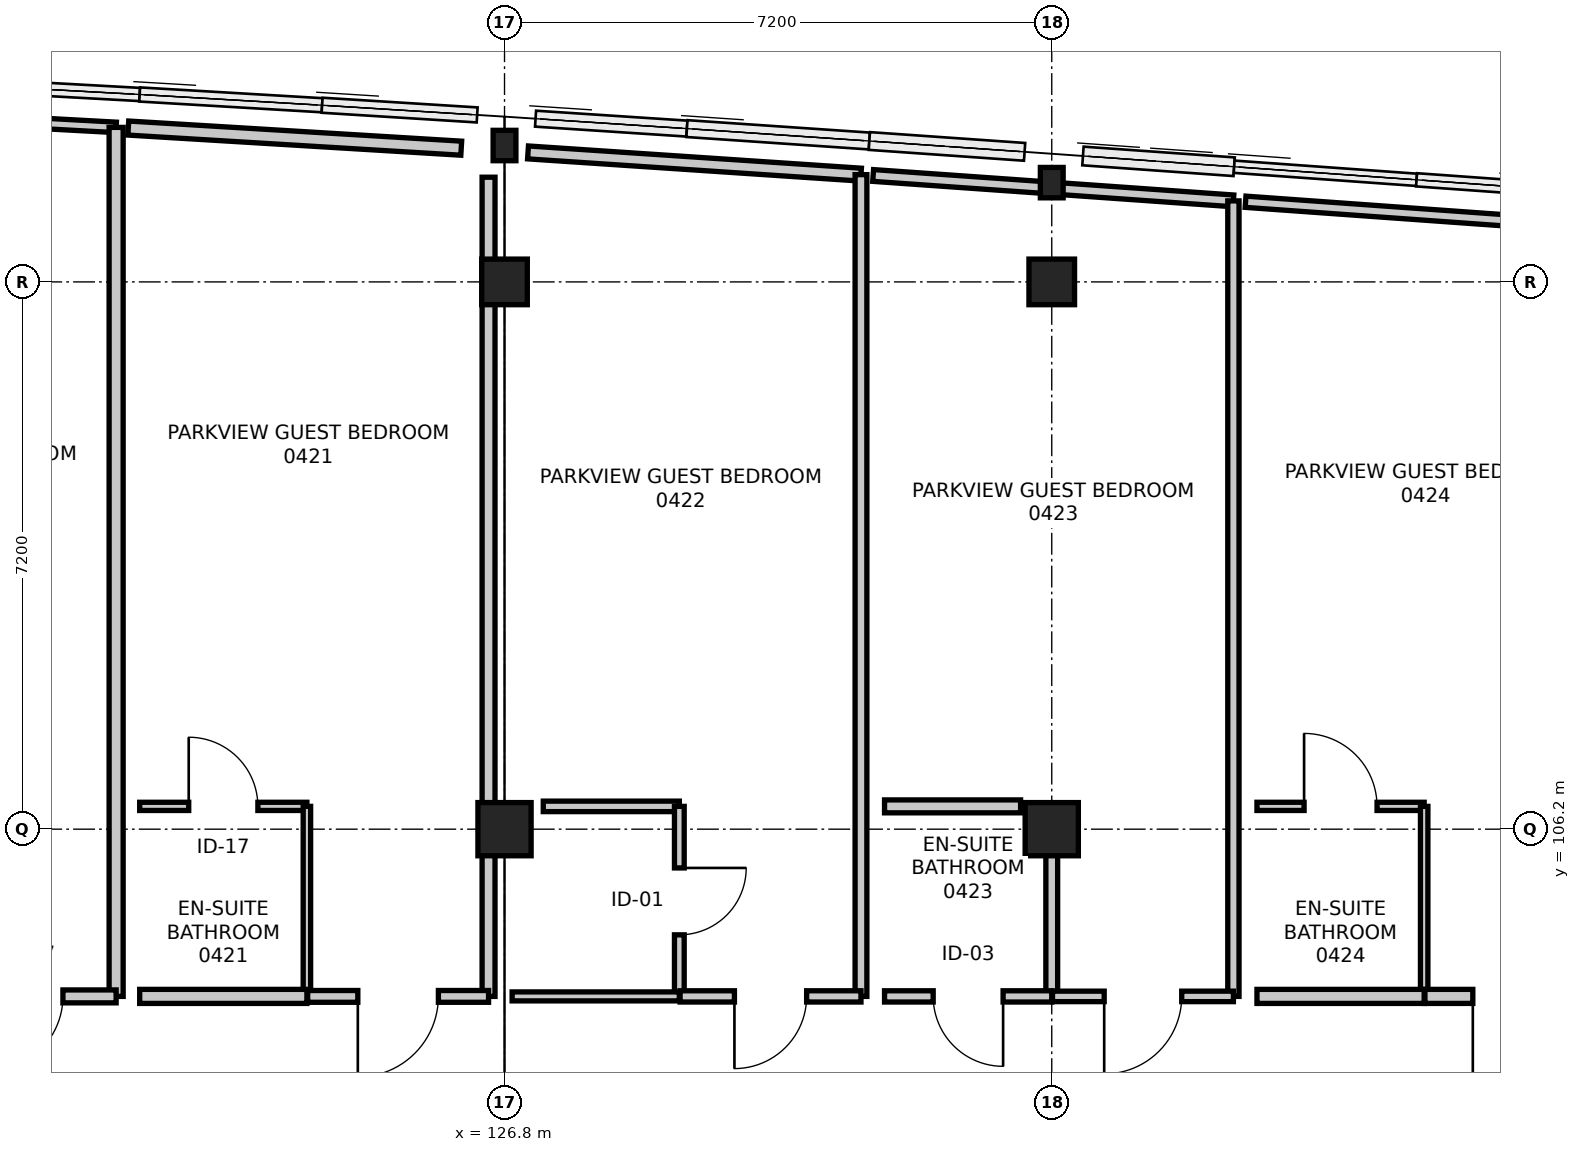
"""IFC4 building model, lengths in metres.
Left out: names, types, materials, properties, quantities, classifications, styles, units other than length and angle.
Written with IfcOpenShell. Run it as: python <this file> out.ifc"""

import sys

from ifc_helpers import new_model, si_unit, direction, frame, frame_2d, origin, origin_2d, place, context, subcontext, project, spatial, rectangle, i_section, extrude, element, fill, save


model = new_model("IFC4")
c1 = context("Model", 3, precision=1e-05, world=origin(), true_north=direction((0.0, 1.0)))
c2 = subcontext(c1, "Body", "Model", "MODEL_VIEW")
j1 = project(units=[si_unit("LENGTHUNIT", "METRE"), si_unit("PLANEANGLEUNIT", "RADIAN")], contexts=[c1])
p1 = place(None, origin())
s1 = spatial("IfcSite", under=j1, at=p1, CompositionType="ELEMENT")
p2 = place(p1, origin())
s2 = spatial("IfcBuilding", under=s1, at=p2, CompositionType="ELEMENT")
p3 = place(p2, frame((0.0, 0.0, 19.2)))
s3 = spatial("IfcBuildingStorey", under=s2, at=p3, CompositionType="ELEMENT", Elevation=19.2)
p4 = place(p3, frame((126.8, 106.2, 0.0), z_axis=(0.0, 0.0, 1.0), x_axis=(1.0, 0.0, 0.0)))
e1 = element("IfcColumn", 1, at=p4, inside=s3, PredefinedType="COLUMN", context=c2, shape_type="SweptSolid", body=[
    extrude(rectangle(XDim=0.7, YDim=0.7, at=origin_2d()), origin(), (0.0, 0.0, 1.0), 3.6),
])
p5 = place(p3, frame((126.8, 113.4, 0.0), z_axis=(0.0, 0.0, 1.0), x_axis=(1.0, 0.0, 0.0)))
e2 = element("IfcColumn", 2, at=p5, inside=s3, PredefinedType="COLUMN", context=c2, shape_type="SweptSolid", body=[
    extrude(rectangle(XDim=0.6, YDim=0.6, at=origin_2d()), origin(), (0.0, 0.0, 1.0), 3.6),
])
p6 = place(p3, frame((126.8, 115.194, 0.0), z_axis=(0.0, 0.0, 1.0), x_axis=(1.0, 0.0, 0.0)))
e3 = element("IfcColumn", 3, at=p6, inside=s3, PredefinedType="COLUMN", context=c2, shape_type="SweptSolid", body=[
    extrude(i_section(OverallWidth=0.3, OverallDepth=0.4, WebThickness=0.013, FlangeThickness=0.024, FilletRadius=0.027, at=origin_2d()), origin(), (0.0, 0.0, 1.0), 3.6),
])
p7 = place(p3, frame((134.0, 106.2, 0.0), z_axis=(0.0, 0.0, 1.0), x_axis=(1.0, 0.0, 0.0)))
e4 = element("IfcColumn", 4, at=p7, inside=s3, PredefinedType="COLUMN", context=c2, shape_type="SweptSolid", body=[
    extrude(rectangle(XDim=0.7, YDim=0.7, at=origin_2d()), origin(), (0.0, 0.0, 1.0), 3.6),
])
p8 = place(p3, frame((134.0, 113.4, 0.0), z_axis=(0.0, 0.0, 1.0), x_axis=(1.0, 0.0, 0.0)))
e5 = element("IfcColumn", 5, at=p8, inside=s3, PredefinedType="COLUMN", context=c2, shape_type="SweptSolid", body=[
    extrude(rectangle(XDim=0.6, YDim=0.6, at=origin_2d()), origin(), (0.0, 0.0, 1.0), 3.6),
])
p9 = place(p3, frame((134.0, 114.706, 0.0), z_axis=(0.0, 0.0, 1.0), x_axis=(1.0, 0.0, 0.0)))
e6 = element("IfcColumn", 6, at=p9, inside=s3, PredefinedType="COLUMN", context=c2, shape_type="SweptSolid", body=[
    extrude(i_section(OverallWidth=0.3, OverallDepth=0.4, WebThickness=0.013, FlangeThickness=0.024, FilletRadius=0.027, at=origin_2d()), origin(), (0.0, 0.0, 1.0), 3.6),
])
p10 = place(p3, frame((119.679, 115.542, 0.0), z_axis=(0.0, 0.0, 1.0), x_axis=(0.998523490871, -0.054321617961, 0.0)))
e7 = element("IfcWall", 7, at=p10, inside=s3, PredefinedType="PARTITIONING", context=c2, shape_type="SweptSolid", body=[
    extrude(rectangle(XDim=2.013, YDim=0.138, at=frame_2d((1.007, 0.0))), origin(), (0.0, 0.0, 1.0), 2.926),
])
p11 = place(p3, frame((121.69, 115.433, 0.0), z_axis=(0.0, 0.0, 1.0), x_axis=(0.0, -1.0, 0.0)))
e8 = element("IfcWall", 8, at=p11, inside=s3, PredefinedType="PARTITIONING", context=c2, shape_type="SweptSolid", body=[
    extrude(rectangle(XDim=11.433, YDim=0.185, at=frame_2d((5.716, 0.0))), origin(), (0.0, 0.0, 1.0), 2.735),
])
p12 = place(p3, frame((121.69, 104.0, 0.0), z_axis=(0.0, 0.0, 1.0), x_axis=(-1.0, 0.0, 0.0)))
e9 = element("IfcWall", 9, at=p12, inside=s3, PredefinedType="PARTITIONING", context=c2, shape_type="SweptSolid", body=[
    extrude(rectangle(XDim=2.38, YDim=0.17, at=frame_2d((1.19, 0.0))), origin(), (0.0, 0.0, 1.0), 2.685),
])
p13 = place(p12, frame((0.7, 0.0, 0.0)))
e10 = element("IfcOpeningElement", 10, at=p13, cuts=e9, PredefinedType="OPENING", context=c2, shape_type="SweptSolid", body=[
    extrude(rectangle(XDim=0.98, YDim=2.15, at=frame_2d((0.49, 1.075))), frame((0.0, 0.095, 0.0), z_axis=(0.0, -1.0, 0.0), x_axis=(1.0, 0.0, 0.0)), (0.0, 0.0, 1.0), 0.19),
])
p14 = place(p3, frame((122.0, 106.5, 0.0), z_axis=(0.0, 0.0, 1.0), x_axis=(1.0, 0.0, 0.0)))
e11 = element("IfcWall", 11, at=p14, inside=s3, PredefinedType="PARTITIONING", context=c2, shape_type="SweptSolid", body=[
    extrude(rectangle(XDim=2.2, YDim=0.108, at=frame_2d((1.1, 0.0))), origin(), (0.0, 0.0, 1.0), 3.35),
])
p15 = place(p14, frame((0.645, 0.0, 0.0)))
e12 = element("IfcOpeningElement", 12, at=p15, cuts=e11, PredefinedType="OPENING", context=c2, shape_type="SweptSolid", body=[
    extrude(rectangle(XDim=0.91, YDim=2.11, at=frame_2d((0.455, 1.055))), frame((0.0, 0.064, 0.0), z_axis=(0.0, -1.0, 0.0), x_axis=(1.0, 0.0, 0.0)), (0.0, 0.0, 1.0), 0.128),
])
p16 = place(p3, frame((124.2, 106.5, 0.0), z_axis=(0.0, 0.0, 1.0), x_axis=(0.0, -1.0, 0.0)))
e13 = element("IfcWall", 13, at=p16, inside=s3, PredefinedType="PARTITIONING", context=c2, shape_type="SweptSolid", body=[
    extrude(rectangle(XDim=2.5, YDim=0.098, at=frame_2d((1.25, 0.0))), origin(), (0.0, 0.0, 1.0), 2.735),
])
p17 = place(p3, frame((124.2, 104.0, 0.0), z_axis=(0.0, 0.0, 1.0), x_axis=(-1.0, 0.0, 0.0)))
e14 = element("IfcWall", 14, at=p17, inside=s3, PredefinedType="PARTITIONING", context=c2, shape_type="SweptSolid", body=[
    extrude(rectangle(XDim=2.2, YDim=0.185, at=frame_2d((1.1, 0.0))), origin(), (0.0, 0.0, 1.0), 3.35),
])
p18 = place(p3, frame((121.85, 115.424, 0.0), z_axis=(0.0, 0.0, 1.0), x_axis=(0.998176732674, -0.060359012147, 0.0)))
e15 = element("IfcWall", 15, at=p18, inside=s3, PredefinedType="PARTITIONING", context=c2, shape_type="SweptSolid", body=[
    extrude(rectangle(XDim=4.389, YDim=0.185, at=frame_2d((2.194, 0.0))), origin(), (0.0, 0.0, 1.0), 2.926),
])
p19 = place(p3, frame((126.59, 114.777, 0.0), z_axis=(0.0, 0.0, 1.0), x_axis=(0.0, -1.0, 0.0)))
e16 = element("IfcWall", 16, at=p19, inside=s3, PredefinedType="PARTITIONING", context=c2, shape_type="SweptSolid", body=[
    extrude(rectangle(XDim=10.777, YDim=0.17, at=frame_2d((5.389, 0.0))), origin(), (0.0, 0.0, 1.0), 2.685),
])
p20 = place(p3, frame((126.59, 104.0, 0.0), z_axis=(0.0, 0.0, 1.0), x_axis=(-1.0, 0.0, 0.0)))
e17 = element("IfcWall", 17, at=p20, inside=s3, PredefinedType="PARTITIONING", context=c2, shape_type="SweptSolid", body=[
    extrude(rectangle(XDim=2.38, YDim=0.155, at=frame_2d((1.19, 0.0))), origin(), (0.0, 0.0, 1.0), 2.685),
])
p21 = place(p20, frame((0.66, 0.0, 0.0)))
e18 = element("IfcOpeningElement", 18, at=p21, cuts=e17, PredefinedType="OPENING", context=c2, shape_type="SweptSolid", body=[
    extrude(rectangle(XDim=1.06, YDim=2.2, at=frame_2d((0.53, 1.1))), frame((0.0, 0.087, 0.0), z_axis=(0.0, -1.0, 0.0), x_axis=(1.0, 0.0, 0.0)), (0.0, 0.0, 1.0), 0.175),
])
p22 = place(p3, frame((127.31, 106.5, 0.0), z_axis=(0.0, 0.0, 1.0), x_axis=(1.0, 0.0, 0.0)))
e19 = element("IfcWall", 19, at=p22, inside=s3, PredefinedType="PARTITIONING", context=c2, shape_type="SweptSolid", body=[
    extrude(rectangle(XDim=1.79, YDim=0.138, at=frame_2d((0.895, 0.0))), origin(), (0.0, 0.0, 1.0), 3.35),
])
p23 = place(p3, frame((129.1, 106.5, 0.0), z_axis=(0.0, 0.0, 1.0), x_axis=(0.0, -1.0, 0.0)))
e20 = element("IfcWall", 20, at=p23, inside=s3, PredefinedType="PARTITIONING", context=c2, shape_type="SweptSolid", body=[
    extrude(rectangle(XDim=2.5, YDim=0.128, at=frame_2d((1.25, 0.0))), origin(), (0.0, 0.0, 1.0), 2.735),
])
p24 = place(p23, frame((0.81, 0.0, 0.0)))
e21 = element("IfcOpeningElement", 21, at=p24, cuts=e20, PredefinedType="OPENING", context=c2, shape_type="SweptSolid", body=[
    extrude(rectangle(XDim=0.88, YDim=2.06, at=frame_2d((0.44, 1.03))), frame((0.0, 0.074, 0.0), z_axis=(0.0, -1.0, 0.0), x_axis=(1.0, 0.0, 0.0)), (0.0, 0.0, 1.0), 0.148),
])
p25 = place(p3, frame((129.1, 104.0, 0.0), z_axis=(0.0, 0.0, 1.0), x_axis=(-1.0, 0.0, 0.0)))
e22 = element("IfcWall", 22, at=p25, inside=s3, PredefinedType="PARTITIONING", context=c2, shape_type="SweptSolid", body=[
    extrude(rectangle(XDim=2.2, YDim=0.118, at=frame_2d((1.1, 0.0))), origin(), (0.0, 0.0, 1.0), 2.685),
])
p26 = place(p3, frame((127.109, 115.104, 0.0), z_axis=(0.0, 0.0, 1.0), x_axis=(0.997782450576, -0.066559607297, 0.0)))
e23 = element("IfcWall", 23, at=p26, inside=s3, PredefinedType="PARTITIONING", context=c2, shape_type="SweptSolid", body=[
    extrude(rectangle(XDim=4.391, YDim=0.17, at=frame_2d((2.195, 0.0))), origin(), (0.0, 0.0, 1.0), 2.926),
])
p27 = place(p3, frame((131.49, 114.811, 0.0), z_axis=(0.0, 0.0, 1.0), x_axis=(0.0, -1.0, 0.0)))
e24 = element("IfcWall", 24, at=p27, inside=s3, PredefinedType="PARTITIONING", context=c2, shape_type="SweptSolid", body=[
    extrude(rectangle(XDim=10.811, YDim=0.155, at=frame_2d((5.406, 0.0))), origin(), (0.0, 0.0, 1.0), 2.735),
])
p28 = place(p3, frame((131.49, 104.0, 0.0), z_axis=(0.0, 0.0, 1.0), x_axis=(-1.0, 0.0, 0.0)))
e25 = element("IfcWall", 25, at=p28, inside=s3, PredefinedType="PARTITIONING", context=c2, shape_type="SweptSolid", body=[
    extrude(rectangle(XDim=2.38, YDim=0.148, at=frame_2d((1.19, 0.0))), origin(), (0.0, 0.0, 1.0), 3.35),
])
p29 = place(p28, frame((0.715, 0.0, 0.0)))
e26 = element("IfcOpeningElement", 26, at=p29, cuts=e25, PredefinedType="OPENING", context=c2, shape_type="SweptSolid", body=[
    extrude(rectangle(XDim=0.95, YDim=2.1, at=frame_2d((0.475, 1.05))), frame((0.0, 0.084, 0.0), z_axis=(0.0, -1.0, 0.0), x_axis=(1.0, 0.0, 0.0)), (0.0, 0.0, 1.0), 0.168),
])
p30 = place(p3, frame((131.8, 106.5, 0.0), z_axis=(0.0, 0.0, 1.0), x_axis=(1.0, 0.0, 0.0)))
e27 = element("IfcWall", 27, at=p30, inside=s3, PredefinedType="PARTITIONING", context=c2, shape_type="SweptSolid", body=[
    extrude(rectangle(XDim=1.79, YDim=0.17, at=frame_2d((0.895, 0.0))), origin(), (0.0, 0.0, 1.0), 2.735),
])
p31 = place(p3, frame((134.0, 106.09, 0.0), z_axis=(0.0, 0.0, 1.0), x_axis=(0.0, -1.0, 0.0)))
e28 = element("IfcWall", 28, at=p31, inside=s3, PredefinedType="PARTITIONING", context=c2, shape_type="SweptSolid", body=[
    extrude(rectangle(XDim=2.09, YDim=0.155, at=frame_2d((1.045, 0.0))), origin(), (0.0, 0.0, 1.0), 2.685),
])
p32 = place(p3, frame((134.0, 104.0, 0.0), z_axis=(0.0, 0.0, 1.0), x_axis=(-1.0, 0.0, 0.0)))
e29 = element("IfcWall", 29, at=p32, inside=s3, PredefinedType="PARTITIONING", context=c2, shape_type="SweptSolid", body=[
    extrude(rectangle(XDim=2.2, YDim=0.148, at=frame_2d((1.1, 0.0))), origin(), (0.0, 0.0, 1.0), 2.685),
])
p33 = place(p32, frame((0.64, 0.0, 0.0)))
e30 = element("IfcOpeningElement", 30, at=p33, cuts=e29, PredefinedType="OPENING", context=c2, shape_type="SweptSolid", body=[
    extrude(rectangle(XDim=0.92, YDim=2.1, at=frame_2d((0.46, 1.05))), frame((0.0, 0.084, 0.0), z_axis=(0.0, -1.0, 0.0), x_axis=(1.0, 0.0, 0.0)), (0.0, 0.0, 1.0), 0.168),
])
p34 = place(p3, frame((131.65, 114.8, 0.0), z_axis=(0.0, 0.0, 1.0), x_axis=(0.997523226445, -0.070337846871, 0.0)))
e31 = element("IfcWall", 31, at=p34, inside=s3, PredefinedType="PARTITIONING", context=c2, shape_type="SweptSolid", body=[
    extrude(rectangle(XDim=4.752, YDim=0.155, at=frame_2d((2.376, 0.0))), origin(), (0.0, 0.0, 1.0), 2.926),
])
p35 = place(p3, frame((136.39, 114.466, 0.0), z_axis=(0.0, 0.0, 1.0), x_axis=(0.0, -1.0, 0.0)))
e32 = element("IfcWall", 32, at=p35, inside=s3, PredefinedType="PARTITIONING", context=c2, shape_type="SweptSolid", body=[
    extrude(rectangle(XDim=10.466, YDim=0.148, at=frame_2d((5.233, 0.0))), origin(), (0.0, 0.0, 1.0), 2.735),
])
p36 = place(p3, frame((136.39, 104.0, 0.0), z_axis=(0.0, 0.0, 1.0), x_axis=(-1.0, 0.0, 0.0)))
e33 = element("IfcWall", 33, at=p36, inside=s3, PredefinedType="PARTITIONING", context=c2, shape_type="SweptSolid", body=[
    extrude(rectangle(XDim=2.38, YDim=0.138, at=frame_2d((1.19, 0.0))), origin(), (0.0, 0.0, 1.0), 2.685),
])
p37 = place(p36, frame((0.68, 0.0, 0.0)))
e34 = element("IfcOpeningElement", 34, at=p37, cuts=e33, PredefinedType="OPENING", context=c2, shape_type="SweptSolid", body=[
    extrude(rectangle(XDim=1.02, YDim=2.15, at=frame_2d((0.51, 1.075))), frame((0.0, 0.079, 0.0), z_axis=(0.0, -1.0, 0.0), x_axis=(1.0, 0.0, 0.0)), (0.0, 0.0, 1.0), 0.158),
])
p38 = place(p3, frame((136.7, 106.5, 0.0), z_axis=(0.0, 0.0, 1.0), x_axis=(1.0, 0.0, 0.0)))
e35 = element("IfcWall", 35, at=p38, inside=s3, PredefinedType="PARTITIONING", context=c2, shape_type="SweptSolid", body=[
    extrude(rectangle(XDim=2.2, YDim=0.108, at=frame_2d((1.1, 0.0))), origin(), (0.0, 0.0, 1.0), 3.35),
])
p39 = place(p38, frame((0.62, 0.0, 0.0)))
e36 = element("IfcOpeningElement", 36, at=p39, cuts=e35, PredefinedType="OPENING", context=c2, shape_type="SweptSolid", body=[
    extrude(rectangle(XDim=0.96, YDim=2.14, at=frame_2d((0.48, 1.07))), frame((0.0, 0.064, 0.0), z_axis=(0.0, -1.0, 0.0), x_axis=(1.0, 0.0, 0.0)), (0.0, 0.0, 1.0), 0.128),
])
p40 = place(p3, frame((138.9, 106.5, 0.0), z_axis=(0.0, 0.0, 1.0), x_axis=(0.0, -1.0, 0.0)))
e37 = element("IfcWall", 37, at=p40, inside=s3, PredefinedType="PARTITIONING", context=c2, shape_type="SweptSolid", body=[
    extrude(rectangle(XDim=2.5, YDim=0.098, at=frame_2d((1.25, 0.0))), origin(), (0.0, 0.0, 1.0), 2.735),
])
p41 = place(p3, frame((138.9, 104.0, 0.0), z_axis=(0.0, 0.0, 1.0), x_axis=(-1.0, 0.0, 0.0)))
e38 = element("IfcWall", 38, at=p41, inside=s3, PredefinedType="PARTITIONING", context=c2, shape_type="SweptSolid", body=[
    extrude(rectangle(XDim=2.2, YDim=0.185, at=frame_2d((1.1, 0.0))), origin(), (0.0, 0.0, 1.0), 3.35),
])
p42 = place(p3, frame((136.55, 114.455, 0.0), z_axis=(0.0, 0.0, 1.0), x_axis=(0.997443290186, -0.071462457721, 0.0)))
e39 = element("IfcWall", 39, at=p42, inside=s3, PredefinedType="PARTITIONING", context=c2, shape_type="SweptSolid", body=[
    extrude(rectangle(XDim=4.752, YDim=0.148, at=frame_2d((2.376, 0.0))), origin(), (0.0, 0.0, 1.0), 2.926),
])
p43 = place(p3, frame((141.29, 104.0, 0.0), z_axis=(0.0, 0.0, 1.0), x_axis=(-1.0, 0.0, 0.0)))
e40 = element("IfcWall", 40, at=p43, inside=s3, PredefinedType="PARTITIONING", context=c2, shape_type="SweptSolid", body=[
    extrude(rectangle(XDim=2.38, YDim=0.185, at=frame_2d((1.19, 0.0))), origin(), (0.0, 0.0, 1.0), 2.685),
])
p44 = place(p43, frame((0.63, 0.0, 0.0)))
e41 = element("IfcOpeningElement", 41, at=p44, cuts=e40, PredefinedType="OPENING", context=c2, shape_type="SweptSolid", body=[
    extrude(rectangle(XDim=1.12, YDim=2.2, at=frame_2d((0.56, 1.1))), frame((0.0, 0.103, 0.0), z_axis=(0.0, -1.0, 0.0), x_axis=(1.0, 0.0, 0.0)), (0.0, 0.0, 1.0), 0.205),
])
p45 = place(p13, origin())
e42 = element("IfcDoor", 42, at=p45, inside=s3, OperationType="SINGLE_SWING_RIGHT", PredefinedType="DOOR", context=c2, shape_type="SweptSolid", body=[
    extrude(rectangle(XDim=0.98, YDim=2.15, at=frame_2d((0.49, 1.075))), frame((0.0, 0.025, 0.0), z_axis=(0.0, -1.0, 0.0), x_axis=(1.0, 0.0, 0.0)), (0.0, 0.0, 1.0), 0.05),
])
fill(e10, e42)
p46 = place(p15, origin())
e43 = element("IfcDoor", 43, at=p46, inside=s3, OperationType="SINGLE_SWING_LEFT", PredefinedType="DOOR", context=c2, shape_type="SweptSolid", body=[
    extrude(rectangle(XDim=0.91, YDim=2.11, at=frame_2d((0.455, 1.055))), frame((0.0, 0.025, 0.0), z_axis=(0.0, -1.0, 0.0), x_axis=(1.0, 0.0, 0.0)), (0.0, 0.0, 1.0), 0.05),
])
fill(e12, e43)
p47 = place(p21, origin())
e44 = element("IfcDoor", 44, at=p47, inside=s3, OperationType="SINGLE_SWING_RIGHT", PredefinedType="DOOR", context=c2, shape_type="SweptSolid", body=[
    extrude(rectangle(XDim=1.06, YDim=2.2, at=frame_2d((0.53, 1.1))), frame((0.0, 0.025, 0.0), z_axis=(0.0, -1.0, 0.0), x_axis=(1.0, 0.0, 0.0)), (0.0, 0.0, 1.0), 0.05),
])
fill(e18, e44)
p48 = place(p24, origin())
e45 = element("IfcDoor", 45, at=p48, inside=s3, OperationType="SINGLE_SWING_LEFT", PredefinedType="DOOR", context=c2, shape_type="SweptSolid", body=[
    extrude(rectangle(XDim=0.88, YDim=2.06, at=frame_2d((0.44, 1.03))), frame((0.0, 0.025, 0.0), z_axis=(0.0, -1.0, 0.0), x_axis=(1.0, 0.0, 0.0)), (0.0, 0.0, 1.0), 0.05),
])
fill(e21, e45)
p49 = place(p29, origin())
e46 = element("IfcDoor", 46, at=p49, inside=s3, OperationType="SINGLE_SWING_RIGHT", PredefinedType="DOOR", context=c2, shape_type="SweptSolid", body=[
    extrude(rectangle(XDim=0.95, YDim=2.1, at=frame_2d((0.475, 1.05))), frame((0.0, 0.025, 0.0), z_axis=(0.0, -1.0, 0.0), x_axis=(1.0, 0.0, 0.0)), (0.0, 0.0, 1.0), 0.05),
])
fill(e26, e46)
p50 = place(p33, origin())
e47 = element("IfcDoor", 47, at=p50, inside=s3, OperationType="SINGLE_SWING_LEFT", PredefinedType="DOOR", context=c2, shape_type="SweptSolid", body=[
    extrude(rectangle(XDim=0.92, YDim=2.1, at=frame_2d((0.46, 1.05))), frame((0.0, 0.025, 0.0), z_axis=(0.0, -1.0, 0.0), x_axis=(1.0, 0.0, 0.0)), (0.0, 0.0, 1.0), 0.05),
])
fill(e30, e47)
p51 = place(p37, origin())
e48 = element("IfcDoor", 48, at=p51, inside=s3, OperationType="SINGLE_SWING_RIGHT", PredefinedType="DOOR", context=c2, shape_type="SweptSolid", body=[
    extrude(rectangle(XDim=1.02, YDim=2.15, at=frame_2d((0.51, 1.075))), frame((0.0, 0.025, 0.0), z_axis=(0.0, -1.0, 0.0), x_axis=(1.0, 0.0, 0.0)), (0.0, 0.0, 1.0), 0.05),
])
fill(e34, e48)
p52 = place(p39, origin())
e49 = element("IfcDoor", 49, at=p52, inside=s3, OperationType="SINGLE_SWING_LEFT", PredefinedType="DOOR", context=c2, shape_type="SweptSolid", body=[
    extrude(rectangle(XDim=0.96, YDim=2.14, at=frame_2d((0.48, 1.07))), frame((0.0, 0.025, 0.0), z_axis=(0.0, -1.0, 0.0), x_axis=(1.0, 0.0, 0.0)), (0.0, 0.0, 1.0), 0.05),
])
fill(e36, e49)
p53 = place(p44, origin())
e50 = element("IfcDoor", 50, at=p53, inside=s3, OperationType="SINGLE_SWING_RIGHT", PredefinedType="DOOR", context=c2, shape_type="SweptSolid", body=[
    extrude(rectangle(XDim=1.12, YDim=2.2, at=frame_2d((0.56, 1.1))), frame((0.0, 0.025, 0.0), z_axis=(0.0, -1.0, 0.0), x_axis=(1.0, 0.0, 0.0)), (0.0, 0.0, 1.0), 0.05),
])
fill(e41, e50)
save(model, sys.argv[1])
